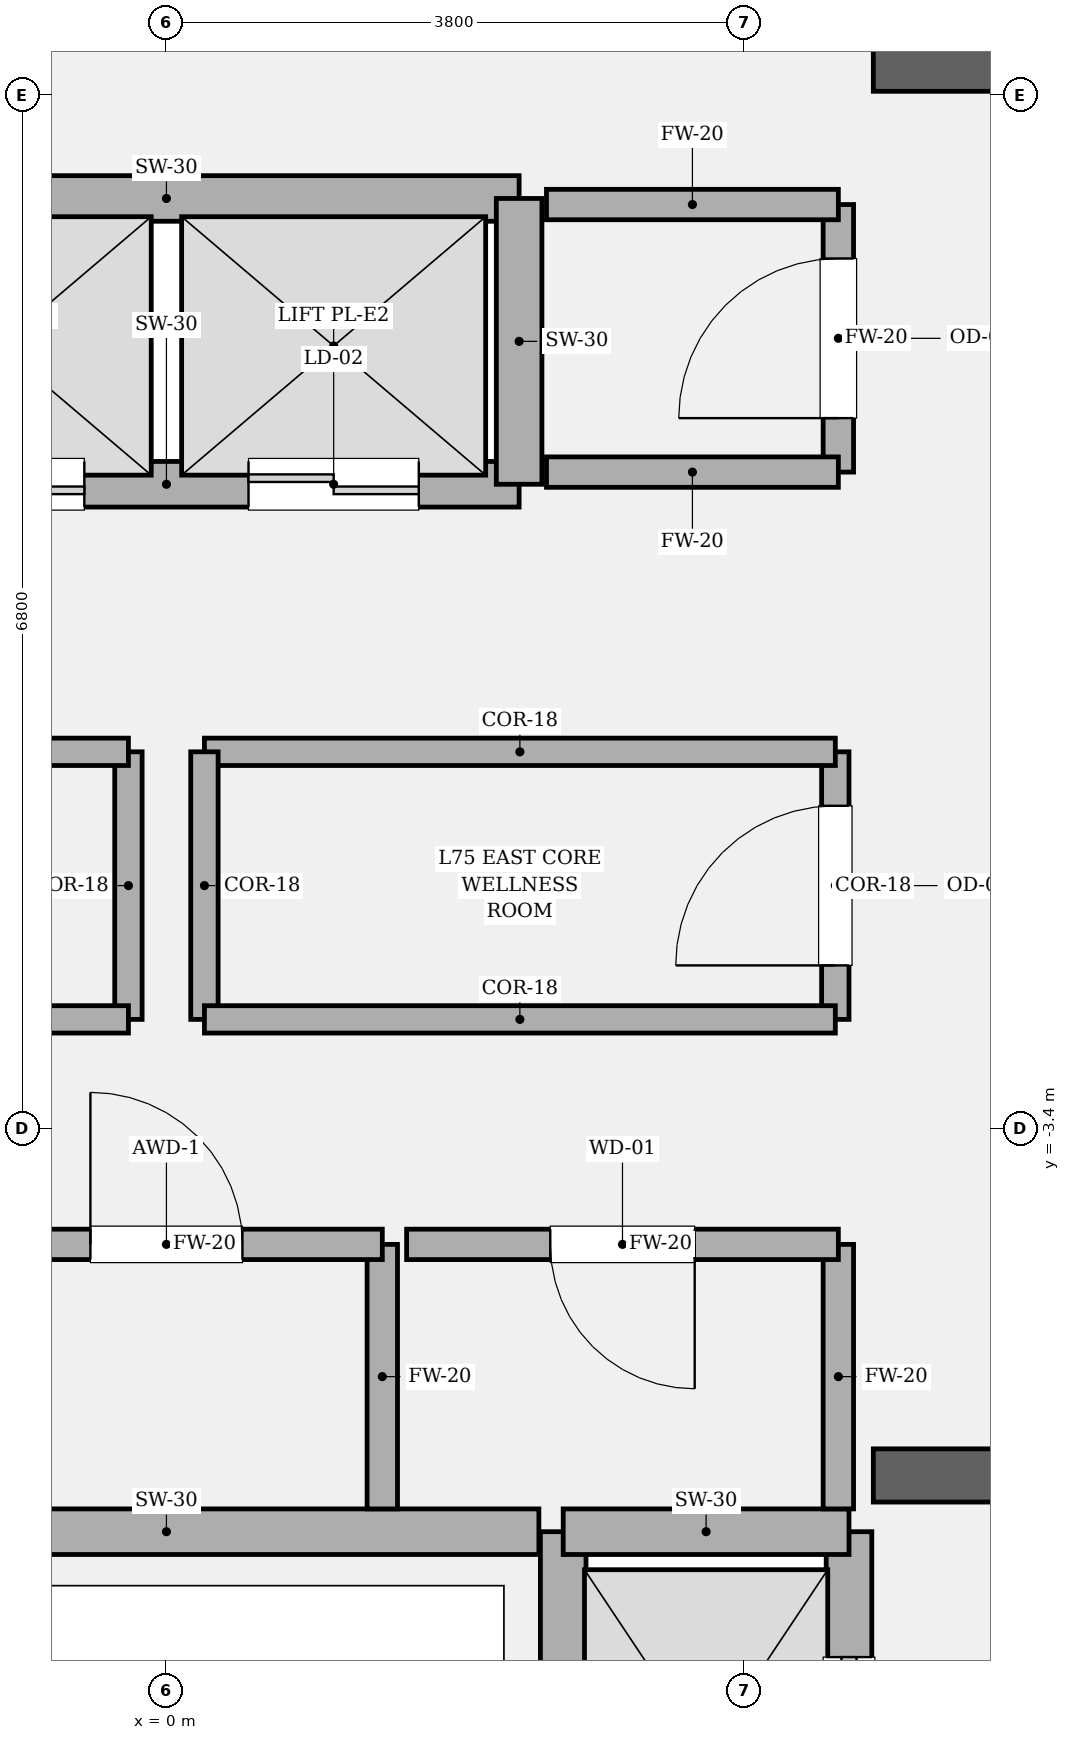
"""IFC4 building model, lengths in metres.
Left out: names, types, materials, properties, quantities, classifications, styles, units other than length and angle.
Written with IfcOpenShell. Run it as: python <this file> out.ifc"""

import sys

from ifc_helpers import new_model, si_unit, direction, frame, frame_2d, origin, place, context, subcontext, project, spatial, rectangle, extrude, element, fill, save


model = new_model("IFC4")
c1 = context("Model", 3, precision=1e-05, world=origin(), true_north=direction((0.0, 1.0)))
c2 = subcontext(c1, "Body", "Model", "MODEL_VIEW")
j1 = project(units=[si_unit("LENGTHUNIT", "METRE"), si_unit("PLANEANGLEUNIT", "RADIAN")], contexts=[c1])
p1 = place(None, origin())
s1 = spatial("IfcSite", under=j1, at=p1, CompositionType="ELEMENT")
p2 = place(p1, origin())
s2 = spatial("IfcBuilding", under=s1, at=p2, CompositionType="ELEMENT")
p3 = place(p2, frame((0.0, 0.0, 317.4)))
s3 = spatial("IfcBuildingStorey", under=s2, at=p3, CompositionType="ELEMENT", Elevation=317.4)
p4 = place(p3, frame((4.65, -5.68, 0.0), z_axis=(0.0, 0.0, 1.0), x_axis=(1.0, 0.0, 0.0)))
e1 = element("IfcWall", 1, at=p4, inside=s3, PredefinedType="SOLIDWALL", context=c2, shape_type="SweptSolid", body=[
    extrude(rectangle(XDim=5.325, YDim=0.35, at=frame_2d((2.663, 0.0))), origin(), (0.0, 0.0, 1.0), 4.2),
])
p5 = place(p4, frame((2.71, 0.0, 0.0)))
e2 = element("IfcOpeningElement", 2, at=p5, cuts=e1, PredefinedType="OPENING", context=c2, shape_type="SweptSolid", body=[
    extrude(rectangle(XDim=1.18, YDim=2.2, at=frame_2d((0.59, 1.1))), frame((0.0, 0.185, 0.0), z_axis=(0.0, -1.0, 0.0), x_axis=(1.0, 0.0, 0.0)), (0.0, 0.0, 1.0), 0.37),
])
p6 = place(p3, frame((4.65, 3.6, 0.0), z_axis=(0.0, 0.0, 1.0), x_axis=(1.0, 0.0, 0.0)))
e3 = element("IfcWall", 3, at=p6, inside=s3, PredefinedType="SOLIDWALL", context=c2, shape_type="SweptSolid", body=[
    extrude(rectangle(XDim=5.325, YDim=0.35, at=frame_2d((2.663, 0.0))), origin(), (0.0, 0.0, 1.0), 4.2),
])
p7 = place(p3, frame((4.49, -8.82, 0.0), z_axis=(0.0, 0.0, 1.0), x_axis=(0.0, 1.0, 0.0)))
e4 = element("IfcWall", 4, at=p7, inside=s3, PredefinedType="SOLIDWALL", context=c2, shape_type="SweptSolid", body=[
    extrude(rectangle(XDim=2.77, YDim=0.3, at=frame_2d((1.385, 0.0))), origin(), (0.0, 0.0, 1.0), 4.0),
])
p8 = place(p7, frame((0.825, 0.0, 0.0)))
e5 = element("IfcOpeningElement", 5, at=p8, cuts=e4, PredefinedType="OPENING", context=c2, shape_type="SweptSolid", body=[
    extrude(rectangle(XDim=1.12, YDim=2.25, at=frame_2d((0.56, 1.125))), frame((0.0, 0.16, 0.0), z_axis=(0.0, -1.0, 0.0), x_axis=(1.0, 0.0, 0.0)), (0.0, 0.0, 1.0), 0.32),
])
p9 = place(p3, frame((2.61, -8.82, 0.0), z_axis=(0.0, 0.0, 1.0), x_axis=(0.0, 1.0, 0.0)))
e6 = element("IfcWall", 6, at=p9, inside=s3, PredefinedType="SOLIDWALL", context=c2, shape_type="SweptSolid", body=[
    extrude(rectangle(XDim=2.77, YDim=0.3, at=frame_2d((1.385, 0.0))), origin(), (0.0, 0.0, 1.0), 4.0),
])
p10 = place(p3, frame((2.61, -6.05, 0.0), z_axis=(0.0, 0.0, 1.0), x_axis=(1.0, 0.0, 0.0)))
e7 = element("IfcWall", 7, at=p10, inside=s3, PredefinedType="SOLIDWALL", context=c2, shape_type="SweptSolid", body=[
    extrude(rectangle(XDim=1.88, YDim=0.3, at=frame_2d((0.94, 0.0))), origin(), (0.0, 0.0, 1.0), 4.0),
])
p11 = place(p3, frame((-2.32, 0.84, 0.0), z_axis=(0.0, 0.0, 1.0), x_axis=(1.0, 0.0, 0.0)))
e8 = element("IfcWall", 8, at=p11, inside=s3, PredefinedType="SOLIDWALL", context=c2, shape_type="SweptSolid", body=[
    extrude(rectangle(XDim=4.64, YDim=0.3, at=frame_2d((2.32, 0.0))), origin(), (0.0, 0.0, 1.0), 4.0),
])
p12 = place(p11, frame((0.66, 0.0, 0.0)))
e9 = element("IfcOpeningElement", 9, at=p12, cuts=e8, PredefinedType="OPENING", context=c2, shape_type="SweptSolid", body=[
    extrude(rectangle(XDim=1.12, YDim=2.25, at=frame_2d((0.56, 1.125))), frame((0.0, 0.16, 0.0), z_axis=(0.0, -1.0, 0.0), x_axis=(1.0, 0.0, 0.0)), (0.0, 0.0, 1.0), 0.32),
])
p13 = place(p11, frame((2.86, 0.0, 0.0)))
e10 = element("IfcOpeningElement", 10, at=p13, cuts=e8, PredefinedType="OPENING", context=c2, shape_type="SweptSolid", body=[
    extrude(rectangle(XDim=1.12, YDim=2.25, at=frame_2d((0.56, 1.125))), frame((0.0, 0.16, 0.0), z_axis=(0.0, -1.0, 0.0), x_axis=(1.0, 0.0, 0.0)), (0.0, 0.0, 1.0), 0.32),
])
p14 = place(p3, frame((-2.32, 2.72, 0.0), z_axis=(0.0, 0.0, 1.0), x_axis=(1.0, 0.0, 0.0)))
e11 = element("IfcWall", 11, at=p14, inside=s3, PredefinedType="SOLIDWALL", context=c2, shape_type="SweptSolid", body=[
    extrude(rectangle(XDim=4.64, YDim=0.3, at=frame_2d((2.32, 0.0))), origin(), (0.0, 0.0, 1.0), 4.0),
])
p15 = place(p3, frame((2.32, 0.84, 0.0), z_axis=(0.0, 0.0, 1.0), x_axis=(0.0, 1.0, 0.0)))
e12 = element("IfcWall", 12, at=p15, inside=s3, PredefinedType="SOLIDWALL", context=c2, shape_type="SweptSolid", body=[
    extrude(rectangle(XDim=1.88, YDim=0.3, at=frame_2d((0.94, 0.0))), origin(), (0.0, 0.0, 1.0), 4.0),
])
p16 = place(p3, frame((-2.45, -6.05, 0.0), z_axis=(0.0, 0.0, 1.0), x_axis=(1.0, 0.0, 0.0)))
e13 = element("IfcWall", 13, at=p16, inside=s3, PredefinedType="SOLIDWALL", context=c2, shape_type="SweptSolid", body=[
    extrude(rectangle(XDim=4.9, YDim=0.3, at=frame_2d((2.45, 0.0))), origin(), (0.0, 0.0, 1.0), 4.0),
])
p17 = place(p3, frame((1.42, -5.9, 0.0), z_axis=(0.0, 0.0, 1.0), x_axis=(0.0, 1.0, 0.0)))
e14 = element("IfcWall", 14, at=p17, inside=s3, PredefinedType="SOLIDWALL", context=c2, shape_type="SweptSolid", body=[
    extrude(rectangle(XDim=1.74, YDim=0.2, at=frame_2d((0.87, 0.0))), origin(), (0.0, 0.0, 1.0), 4.0),
])
p18 = place(p3, frame((1.42, -4.16, 0.0), z_axis=(0.0, 0.0, 1.0), x_axis=(-1.0, 0.0, 0.0)))
e15 = element("IfcWall", 15, at=p18, inside=s3, PredefinedType="SOLIDWALL", context=c2, shape_type="SweptSolid", body=[
    extrude(rectangle(XDim=2.84, YDim=0.2, at=frame_2d((1.42, 0.0))), origin(), (0.0, 0.0, 1.0), 4.0),
])
p19 = place(p18, frame((0.92, 0.0, 0.0)))
e16 = element("IfcOpeningElement", 16, at=p19, cuts=e15, PredefinedType="OPENING", context=c2, shape_type="SweptSolid", body=[
    extrude(rectangle(XDim=1.0, YDim=2.15, at=frame_2d((0.5, 1.075))), frame((0.0, 0.11, 0.0), z_axis=(0.0, -1.0, 0.0), x_axis=(1.0, 0.0, 0.0)), (0.0, 0.0, 1.0), 0.22),
])
p20 = place(p3, frame((4.42, -5.9, 0.0), z_axis=(0.0, 0.0, 1.0), x_axis=(0.0, 1.0, 0.0)))
e17 = element("IfcWall", 17, at=p20, inside=s3, PredefinedType="SOLIDWALL", context=c2, shape_type="SweptSolid", body=[
    extrude(rectangle(XDim=1.74, YDim=0.2, at=frame_2d((0.87, 0.0))), origin(), (0.0, 0.0, 1.0), 4.0),
])
p21 = place(p3, frame((4.42, -4.16, 0.0), z_axis=(0.0, 0.0, 1.0), x_axis=(-1.0, 0.0, 0.0)))
e18 = element("IfcWall", 18, at=p21, inside=s3, PredefinedType="SOLIDWALL", context=c2, shape_type="SweptSolid", body=[
    extrude(rectangle(XDim=2.84, YDim=0.2, at=frame_2d((1.42, 0.0))), origin(), (0.0, 0.0, 1.0), 4.0),
])
p22 = place(p21, frame((0.945, 0.0, 0.0)))
e19 = element("IfcOpeningElement", 19, at=p22, cuts=e18, PredefinedType="OPENING", context=c2, shape_type="SweptSolid", body=[
    extrude(rectangle(XDim=0.95, YDim=2.15, at=frame_2d((0.475, 1.075))), frame((0.0, 0.11, 0.0), z_axis=(0.0, -1.0, 0.0), x_axis=(1.0, 0.0, 0.0)), (0.0, 0.0, 1.0), 0.22),
])
p23 = place(p3, frame((-0.25, -2.68, 0.0), z_axis=(0.0, 0.0, 1.0), x_axis=(0.0, 1.0, 0.0)))
e20 = element("IfcWall", 20, at=p23, inside=s3, PredefinedType="PARTITIONING", context=c2, shape_type="SweptSolid", body=[
    extrude(rectangle(XDim=1.76, YDim=0.18, at=frame_2d((0.88, 0.0))), origin(), (0.0, 0.0, 1.0), 4.0),
])
p24 = place(p3, frame((-0.25, -0.92, 0.0), z_axis=(0.0, 0.0, 1.0), x_axis=(-1.0, 0.0, 0.0)))
e21 = element("IfcWall", 21, at=p24, inside=s3, PredefinedType="PARTITIONING", context=c2, shape_type="SweptSolid", body=[
    extrude(rectangle(XDim=4.15, YDim=0.18, at=frame_2d((2.075, 0.0))), origin(), (0.0, 0.0, 1.0), 4.0),
])
p25 = place(p24, frame((1.55, 0.0, 0.0)))
e22 = element("IfcOpeningElement", 22, at=p25, cuts=e21, PredefinedType="OPENING", context=c2, shape_type="SweptSolid", body=[
    extrude(rectangle(XDim=1.05, YDim=2.2, at=frame_2d((0.525, 1.1))), frame((0.0, 0.1, 0.0), z_axis=(0.0, -1.0, 0.0), x_axis=(1.0, 0.0, 0.0)), (0.0, 0.0, 1.0), 0.2),
])
p26 = place(p3, frame((-4.4, -2.68, 0.0), z_axis=(0.0, 0.0, 1.0), x_axis=(1.0, 0.0, 0.0)))
e23 = element("IfcWall", 23, at=p26, inside=s3, PredefinedType="PARTITIONING", context=c2, shape_type="SweptSolid", body=[
    extrude(rectangle(XDim=4.15, YDim=0.18, at=frame_2d((2.075, 0.0))), origin(), (0.0, 0.0, 1.0), 4.0),
])
p27 = place(p3, frame((4.4, -2.68, 0.0), z_axis=(0.0, 0.0, 1.0), x_axis=(0.0, 1.0, 0.0)))
e24 = element("IfcWall", 24, at=p27, inside=s3, PredefinedType="PARTITIONING", context=c2, shape_type="SweptSolid", body=[
    extrude(rectangle(XDim=1.76, YDim=0.18, at=frame_2d((0.88, 0.0))), origin(), (0.0, 0.0, 1.0), 4.0),
])
p28 = place(p27, frame((0.355, 0.0, 0.0)))
e25 = element("IfcOpeningElement", 25, at=p28, cuts=e24, PredefinedType="OPENING", context=c2, shape_type="SweptSolid", body=[
    extrude(rectangle(XDim=1.05, YDim=2.2, at=frame_2d((0.525, 1.1))), frame((0.0, 0.1, 0.0), z_axis=(0.0, -1.0, 0.0), x_axis=(1.0, 0.0, 0.0)), (0.0, 0.0, 1.0), 0.2),
])
p29 = place(p3, frame((4.4, -0.92, 0.0), z_axis=(0.0, 0.0, 1.0), x_axis=(-1.0, 0.0, 0.0)))
e26 = element("IfcWall", 26, at=p29, inside=s3, PredefinedType="PARTITIONING", context=c2, shape_type="SweptSolid", body=[
    extrude(rectangle(XDim=4.15, YDim=0.18, at=frame_2d((2.075, 0.0))), origin(), (0.0, 0.0, 1.0), 4.0),
])
p30 = place(p3, frame((0.25, -0.92, 0.0), z_axis=(0.0, 0.0, 1.0), x_axis=(0.0, -1.0, 0.0)))
e27 = element("IfcWall", 27, at=p30, inside=s3, PredefinedType="PARTITIONING", context=c2, shape_type="SweptSolid", body=[
    extrude(rectangle(XDim=1.76, YDim=0.18, at=frame_2d((0.88, 0.0))), origin(), (0.0, 0.0, 1.0), 4.0),
])
p31 = place(p3, frame((0.25, -2.68, 0.0), z_axis=(0.0, 0.0, 1.0), x_axis=(1.0, 0.0, 0.0)))
e28 = element("IfcWall", 28, at=p31, inside=s3, PredefinedType="PARTITIONING", context=c2, shape_type="SweptSolid", body=[
    extrude(rectangle(XDim=4.15, YDim=0.18, at=frame_2d((2.075, 0.0))), origin(), (0.0, 0.0, 1.0), 4.0),
])
p32 = place(p3, frame((4.42, 0.92, 0.0), z_axis=(0.0, 0.0, 1.0), x_axis=(0.0, 1.0, 0.0)))
e29 = element("IfcWall", 29, at=p32, inside=s3, PredefinedType="SOLIDWALL", context=c2, shape_type="SweptSolid", body=[
    extrude(rectangle(XDim=1.76, YDim=0.2, at=frame_2d((0.88, 0.0))), origin(), (0.0, 0.0, 1.0), 4.0),
])
p33 = place(p32, frame((0.355, 0.0, 0.0)))
e30 = element("IfcOpeningElement", 30, at=p33, cuts=e29, PredefinedType="OPENING", context=c2, shape_type="SweptSolid", body=[
    extrude(rectangle(XDim=1.05, YDim=2.2, at=frame_2d((0.525, 1.1))), frame((0.0, 0.11, 0.0), z_axis=(0.0, -1.0, 0.0), x_axis=(1.0, 0.0, 0.0)), (0.0, 0.0, 1.0), 0.22),
])
for number, where, z_axis, x_axis in (
    (31, (4.42, 2.68, 0.0), (0.0, 0.0, 1.0), (-1.0, 0.0, 0.0)),
    (32, (2.5, 0.92, 0.0), (0.0, 0.0, 1.0), (1.0, 0.0, 0.0)),
):
    element("IfcWall", number, at=place(p3, frame(where, z_axis=z_axis, x_axis=x_axis)), inside=s3, PredefinedType="SOLIDWALL", context=c2, shape_type="SweptSolid", body=[
        extrude(rectangle(XDim=1.92, YDim=0.2, at=frame_2d((0.96, 0.0))), origin(), (0.0, 0.0, 1.0), 4.0),
    ])
p34 = place(p8, origin())
e33 = element("IfcDoor", 33, at=p34, inside=s3, OperationType="SLIDING_TO_RIGHT", PredefinedType="DOOR", context=c2, shape_type="SweptSolid", body=[
    extrude(rectangle(XDim=1.12, YDim=2.25, at=frame_2d((0.56, 1.125))), frame((0.0, 0.025, 0.0), z_axis=(0.0, -1.0, 0.0), x_axis=(1.0, 0.0, 0.0)), (0.0, 0.0, 1.0), 0.05),
])
fill(e5, e33)
p35 = place(p12, origin())
e34 = element("IfcDoor", 34, at=p35, inside=s3, OperationType="DOUBLE_DOOR_SLIDING", PredefinedType="DOOR", context=c2, shape_type="SweptSolid", body=[
    extrude(rectangle(XDim=1.12, YDim=2.25, at=frame_2d((0.56, 1.125))), frame((0.0, 0.025, 0.0), z_axis=(0.0, -1.0, 0.0), x_axis=(1.0, 0.0, 0.0)), (0.0, 0.0, 1.0), 0.05),
])
fill(e9, e34)
p36 = place(p13, origin())
e35 = element("IfcDoor", 35, at=p36, inside=s3, OperationType="DOUBLE_DOOR_SLIDING", PredefinedType="DOOR", context=c2, shape_type="SweptSolid", body=[
    extrude(rectangle(XDim=1.12, YDim=2.25, at=frame_2d((0.56, 1.125))), frame((0.0, 0.025, 0.0), z_axis=(0.0, -1.0, 0.0), x_axis=(1.0, 0.0, 0.0)), (0.0, 0.0, 1.0), 0.05),
])
fill(e10, e35)
p37 = place(p19, origin())
e36 = element("IfcDoor", 36, at=p37, inside=s3, OperationType="SINGLE_SWING_RIGHT", PredefinedType="DOOR", context=c2, shape_type="SweptSolid", body=[
    extrude(rectangle(XDim=1.0, YDim=2.15, at=frame_2d((0.5, 1.075))), frame((0.0, 0.025, 0.0), z_axis=(0.0, -1.0, 0.0), x_axis=(1.0, 0.0, 0.0)), (0.0, 0.0, 1.0), 0.05),
])
fill(e16, e36)
p38 = place(p22, origin())
e37 = element("IfcDoor", 37, at=p38, inside=s3, OperationType="SINGLE_SWING_LEFT", PredefinedType="DOOR", context=c2, shape_type="SweptSolid", body=[
    extrude(rectangle(XDim=0.95, YDim=2.15, at=frame_2d((0.475, 1.075))), frame((0.0, 0.025, 0.0), z_axis=(0.0, -1.0, 0.0), x_axis=(1.0, 0.0, 0.0)), (0.0, 0.0, 1.0), 0.05),
])
fill(e19, e37)
p39 = place(p28, origin())
e38 = element("IfcDoor", 38, at=p39, inside=s3, OperationType="SINGLE_SWING_LEFT", PredefinedType="DOOR", context=c2, shape_type="SweptSolid", body=[
    extrude(rectangle(XDim=1.05, YDim=2.2, at=frame_2d((0.525, 1.1))), frame((0.0, 0.025, 0.0), z_axis=(0.0, -1.0, 0.0), x_axis=(1.0, 0.0, 0.0)), (0.0, 0.0, 1.0), 0.05),
])
fill(e25, e38)
p40 = place(p33, origin())
e39 = element("IfcDoor", 39, at=p40, inside=s3, OperationType="SINGLE_SWING_LEFT", PredefinedType="DOOR", context=c2, shape_type="SweptSolid", body=[
    extrude(rectangle(XDim=1.05, YDim=2.2, at=frame_2d((0.525, 1.1))), frame((0.0, 0.025, 0.0), z_axis=(0.0, -1.0, 0.0), x_axis=(1.0, 0.0, 0.0)), (0.0, 0.0, 1.0), 0.05),
])
fill(e30, e39)
save(model, sys.argv[1])
